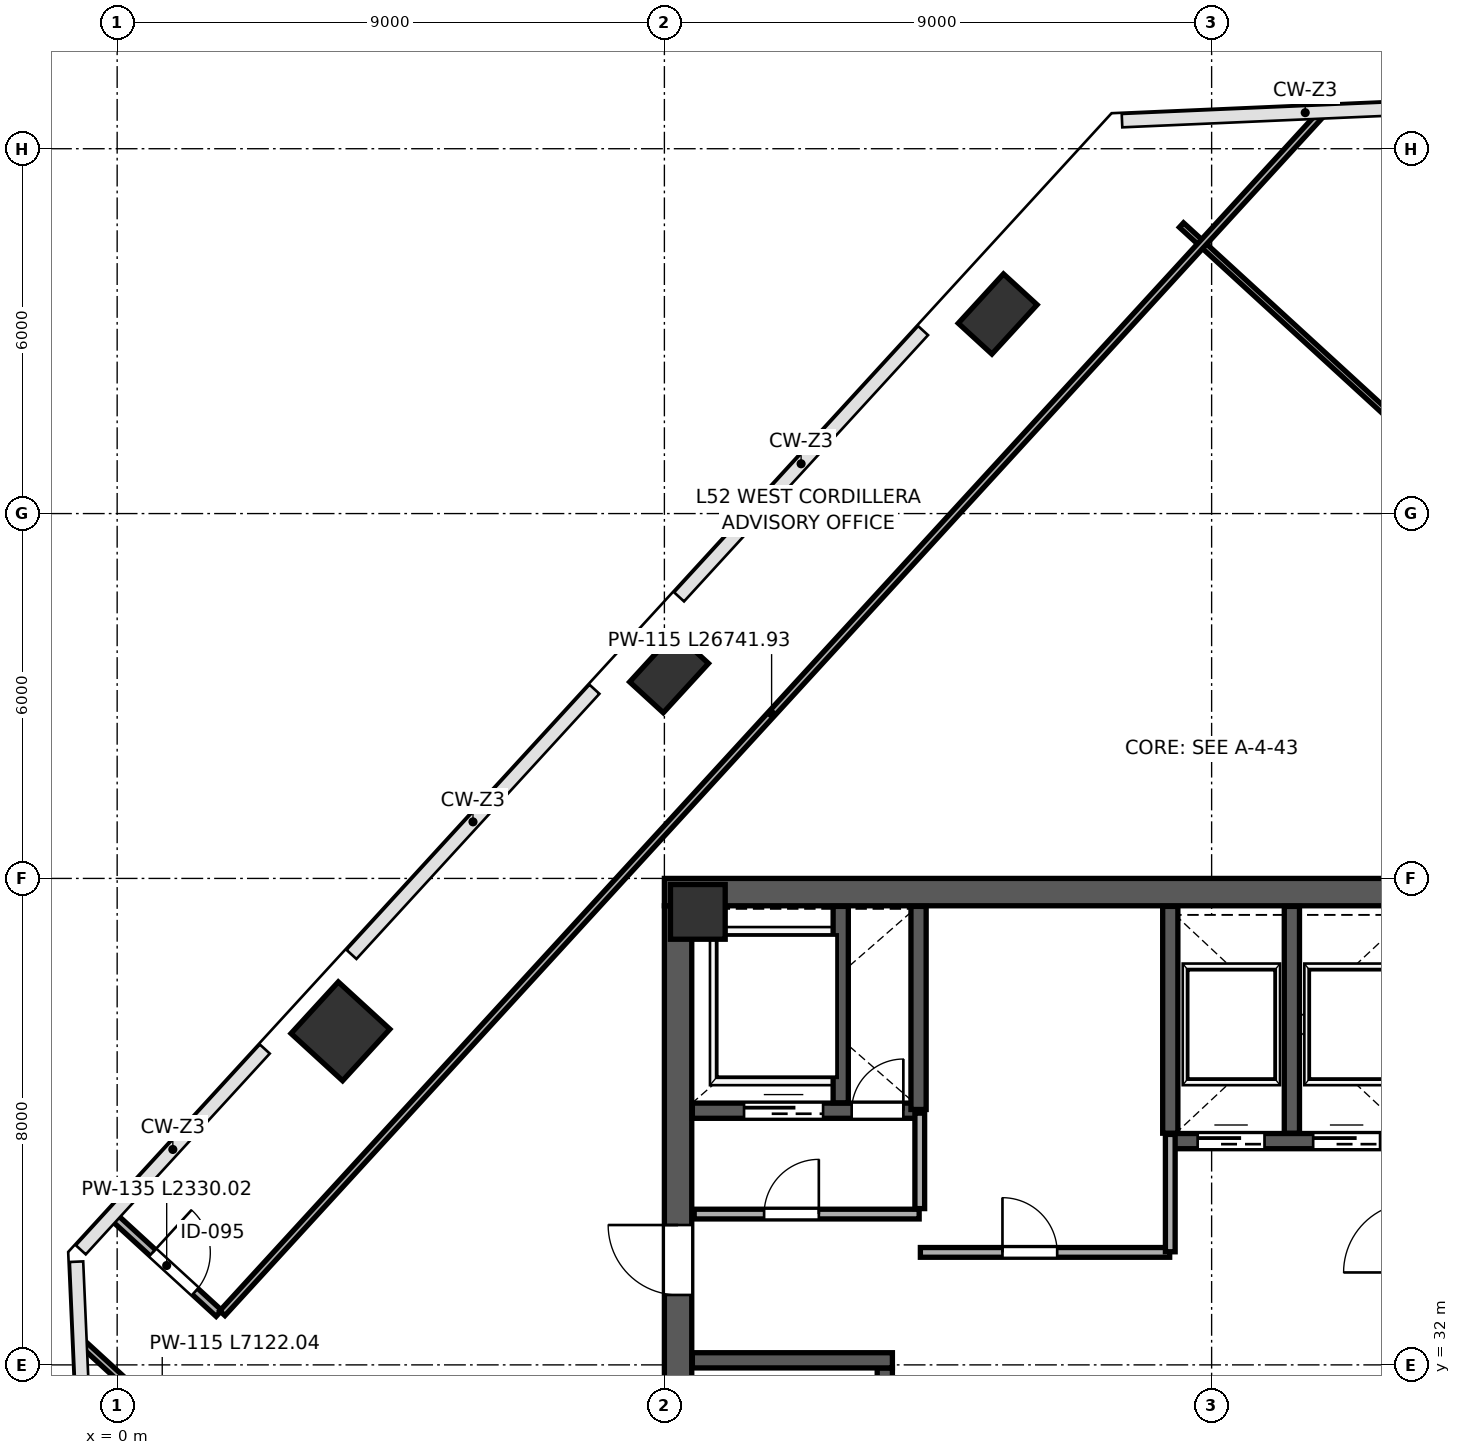
"""IFC4 building model, lengths in metres.
Left out: names, types, materials, properties, quantities, classifications, styles, units other than length and angle.
Written with IfcOpenShell. Run it as: python <this file> out.ifc"""

import sys

from ifc_helpers import new_model, si_unit, direction, frame, frame_2d, origin, origin_2d, place, context, subcontext, project, spatial, rectangle, extrude, source, transform, mapped, element, fill, save


model = new_model("IFC4")
c1 = context("Model", 3, precision=1e-05, world=origin(), true_north=direction((0.0, 1.0)))
c2 = subcontext(c1, "Body", "Model", "MODEL_VIEW")
j1 = project(units=[si_unit("LENGTHUNIT", "METRE"), si_unit("PLANEANGLEUNIT", "RADIAN")], contexts=[c1])
p1 = place(None, origin())
s1 = spatial("IfcSite", under=j1, at=p1, CompositionType="ELEMENT")
p2 = place(p1, origin())
s2 = spatial("IfcBuilding", under=s1, at=p2, CompositionType="ELEMENT")
p3 = place(p2, frame((0.0, 0.0, 233.2)))
s3 = spatial("IfcBuildingStorey", under=s2, at=p3, CompositionType="ELEMENT", Elevation=233.2)
m1 = source(origin(), c2, "Body", "SweptSolid", [
    extrude(rectangle(XDim=0.9, YDim=0.9, at=origin_2d()), origin(), (0.0, 0.0, 1.0), 4.198),
])
p4 = place(p3, frame((9.55, 39.45, 0.001), z_axis=(0.0, 0.0, 1.0), x_axis=(1.0, 0.0, 0.0)))
e1 = element("IfcColumn", 1, at=p4, inside=s3, PredefinedType="COLUMN", context=c2, shape_type="MappedRepresentation", body=[
    mapped(m1, transform((0.0, 0.0, 0.0), scale=1.0)),
])
m2 = source(origin(), c2, "Body", "SweptSolid", [
    extrude(rectangle(XDim=1.15, YDim=1.15, at=origin_2d()), origin(), (0.0, 0.0, 1.0), 4.198),
])
p5 = place(p3, frame((3.672, 37.486, 0.001), z_axis=(0.0, 0.0, 1.0), x_axis=(-0.73727733681, 0.675590207616, 0.0)))
e2 = element("IfcColumn", 2, at=p5, inside=s3, PredefinedType="COLUMN", context=c2, shape_type="MappedRepresentation", body=[
    mapped(m2, transform((0.0, 0.0, 0.0), scale=1.0)),
])
m3 = source(origin(), c2, "Body", "SweptSolid", [
    extrude(rectangle(XDim=0.75, YDim=1.1, at=origin_2d()), origin(), (0.0, 0.0, 1.0), 4.198),
])
for number, where, z_axis, x_axis in (
    (3, (9.077, 43.384, 0.001), (0.0, 0.0, 1.0), (-0.737, 0.676, 0.0)),
    (4, (14.482, 49.282, 0.001), (0.0, 0.0, 1.0), (-0.737, 0.676, 0.0)),
):
    element("IfcColumn", number, at=place(p3, frame(where, z_axis=z_axis, x_axis=x_axis)), inside=s3, PredefinedType="PILASTER", context=c2, shape_type="MappedRepresentation", body=[
        mapped(m3, transform((0.0, 0.0, 0.0), scale=1.0)),
    ])
p6 = place(p3, frame((9.225, 24.45, 0.0), z_axis=(0.0, 0.0, 1.0), x_axis=(0.0, 1.0, 0.0)))
e5 = element("IfcWall", 5, at=p6, inside=s3, PredefinedType="SHEAR", context=c2, shape_type="SweptSolid", body=[
    extrude(rectangle(XDim=15.1, YDim=0.45, at=frame_2d((7.55, 0.0))), origin(), (0.0, 0.0, 1.0), 3.96),
])
p7 = place(p6, frame((8.7, 0.0, 0.0)))
e6 = element("IfcOpeningElement", 6, at=p7, cuts=e5, PredefinedType="OPENING", context=c2, shape_type="SweptSolid", body=[
    extrude(rectangle(XDim=1.15, YDim=2.2, at=frame_2d((0.575, 1.1))), frame((0.0, 0.235, 0.0), z_axis=(0.0, -1.0, 0.0), x_axis=(1.0, 0.0, 0.0)), (0.0, 0.0, 1.0), 0.47),
])
p8 = place(p3, frame((9.0, 39.775, 0.0), z_axis=(0.0, 0.0, 1.0), x_axis=(1.0, 0.0, 0.0)))
e7 = element("IfcWall", 7, at=p8, inside=s3, PredefinedType="SHEAR", context=c2, shape_type="SweptSolid", body=[
    extrude(rectangle(XDim=18.0, YDim=0.45, at=frame_2d((9.0, 0.0))), origin(), (0.0, 0.0, 1.0), 3.96),
])
p9 = place(p3, frame((12.625, 24.46, 0.0), z_axis=(0.0, 0.0, 1.0), x_axis=(0.0, 1.0, 0.0)))
e8 = element("IfcWall", 8, at=p9, inside=s3, PredefinedType="SHEAR", context=c2, shape_type="SweptSolid", body=[
    extrude(rectangle(XDim=7.49, YDim=0.25, at=frame_2d((3.745, 0.0))), origin(), (0.0, 0.0, 1.0), 3.96),
])
p10 = place(p9, frame((5.85, 0.0, 0.0)))
e9 = element("IfcOpeningElement", 9, at=p10, cuts=e8, PredefinedType="OPENING", context=c2, shape_type="SweptSolid", body=[
    extrude(rectangle(XDim=1.15, YDim=2.2, at=frame_2d((0.575, 1.1))), frame((0.0, 0.135, 0.0), z_axis=(0.0, -1.0, 0.0), x_axis=(1.0, 0.0, 0.0)), (0.0, 0.0, 1.0), 0.27),
])
p11 = place(p3, frame((9.46, 32.075, 0.0), z_axis=(0.0, 0.0, 1.0), x_axis=(1.0, 0.0, 0.0)))
e10 = element("IfcWall", 10, at=p11, inside=s3, PredefinedType="SHEAR", context=c2, shape_type="SweptSolid", body=[
    extrude(rectangle(XDim=3.29, YDim=0.25, at=frame_2d((1.645, 0.0))), origin(), (0.0, 0.0, 1.0), 3.96),
])
p12 = place(p3, frame((9.46, 36.18, 0.0), z_axis=(0.0, 0.0, 1.0), x_axis=(1.0, 0.0, 0.0)))
e11 = element("IfcWall", 11, at=p12, inside=s3, PredefinedType="SHEAR", context=c2, shape_type="SweptSolid", body=[
    extrude(rectangle(XDim=3.79, YDim=0.25, at=frame_2d((1.895, 0.0))), origin(), (0.0, 0.0, 1.0), 3.96),
])
p13 = place(p12, frame((2.62, 0.0, 0.0)))
e12 = element("IfcOpeningElement", 12, at=p13, cuts=e11, PredefinedType="OPENING", context=c2, shape_type="SweptSolid", body=[
    extrude(rectangle(XDim=0.85, YDim=2.1, at=frame_2d((0.425, 1.05))), frame((0.0, 0.135, 0.0), z_axis=(0.0, -1.0, 0.0), x_axis=(1.0, 0.0, 0.0)), (0.0, 0.0, 1.0), 0.27),
])
p14 = place(p12, frame((0.85, 0.0, 0.0)))
e13 = element("IfcOpeningElement", 13, at=p14, cuts=e11, PredefinedType="OPENING", context=c2, shape_type="SweptSolid", body=[
    extrude(rectangle(XDim=1.3, YDim=2.25, at=frame_2d((0.65, 1.125))), frame((0.0, 0.135, 0.0), z_axis=(0.0, -1.0, 0.0), x_axis=(1.0, 0.0, 0.0)), (0.0, 0.0, 1.0), 0.27),
])
p15 = place(p3, frame((11.9, 36.31, 0.0), z_axis=(0.0, 0.0, 1.0), x_axis=(0.0, 1.0, 0.0)))
e14 = element("IfcWall", 14, at=p15, inside=s3, PredefinedType="SHEAR", context=c2, shape_type="SweptSolid", body=[
    extrude(rectangle(XDim=3.23, YDim=0.25, at=frame_2d((1.615, 0.0))), origin(), (0.0, 0.0, 1.0), 3.96),
])
p16 = place(p3, frame((13.18, 36.2, 0.0), z_axis=(0.0, 0.0, 1.0), x_axis=(0.0, 1.0, 0.0)))
e15 = element("IfcWall", 15, at=p16, inside=s3, PredefinedType="SHEAR", context=c2, shape_type="SweptSolid", body=[
    extrude(rectangle(XDim=3.34, YDim=0.25, at=frame_2d((1.67, 0.0))), origin(), (0.0, 0.0, 1.0), 3.96),
])
p17 = place(p3, frame((17.32, 35.68, 0.0), z_axis=(0.0, 0.0, 1.0), x_axis=(1.0, 0.0, 0.0)))
e16 = element("IfcWall", 16, at=p17, inside=s3, PredefinedType="SHEAR", context=c2, shape_type="SweptSolid", body=[
    extrude(rectangle(XDim=3.87, YDim=0.25, at=frame_2d((1.935, 0.0))), origin(), (0.0, 0.0, 1.0), 3.96),
])
p18 = place(p17, frame((0.45, 0.0, 0.0)))
e17 = element("IfcOpeningElement", 17, at=p18, cuts=e16, PredefinedType="OPENING", context=c2, shape_type="SweptSolid", body=[
    extrude(rectangle(XDim=1.1, YDim=2.2, at=frame_2d((0.55, 1.1))), frame((0.0, 0.135, 0.0), z_axis=(0.0, -1.0, 0.0), x_axis=(1.0, 0.0, 0.0)), (0.0, 0.0, 1.0), 0.27),
])
p19 = place(p17, frame((2.35, 0.0, 0.0)))
e18 = element("IfcOpeningElement", 18, at=p19, cuts=e16, PredefinedType="OPENING", context=c2, shape_type="SweptSolid", body=[
    extrude(rectangle(XDim=1.1, YDim=2.2, at=frame_2d((0.55, 1.1))), frame((0.0, 0.135, 0.0), z_axis=(0.0, -1.0, 0.0), x_axis=(1.0, 0.0, 0.0)), (0.0, 0.0, 1.0), 0.27),
])
for number, where, z_axis, x_axis in (
    (19, (17.32, 35.81, 0.0), (0.0, 0.0, 1.0), (0.0, 1.0, 0.0)),
    (20, (19.32, 35.81, 0.0), (0.0, 0.0, 1.0), (0.0, 1.0, 0.0)),
):
    element("IfcWall", number, at=place(p3, frame(where, z_axis=z_axis, x_axis=x_axis)), inside=s3, PredefinedType="SHEAR", context=c2, shape_type="SweptSolid", body=[
        extrude(rectangle(XDim=3.73, YDim=0.25, at=frame_2d((1.865, 0.0))), origin(), (0.0, 0.0, 1.0), 3.96),
    ])
p20 = place(p3, frame((9.49, 34.48, 0.0), z_axis=(0.0, 0.0, 1.0), x_axis=(1.0, 0.0, 0.0)))
e21 = element("IfcWall", 21, at=p20, inside=s3, PredefinedType="PARTITIONING", context=c2, shape_type="SweptSolid", body=[
    extrude(rectangle(XDim=3.7, YDim=0.16, at=frame_2d((1.85, 0.0))), origin(), (0.0, 0.0, 1.0), 3.96),
])
p21 = place(p20, frame((1.15, 0.0, 0.0)))
e22 = element("IfcOpeningElement", 22, at=p21, cuts=e21, PredefinedType="OPENING", context=c2, shape_type="SweptSolid", body=[
    extrude(rectangle(XDim=0.9, YDim=2.15, at=frame_2d((0.45, 1.075))), frame((0.0, 0.09, 0.0), z_axis=(0.0, -1.0, 0.0), x_axis=(1.0, 0.0, 0.0)), (0.0, 0.0, 1.0), 0.18),
])
p22 = place(p3, frame((13.2, 34.57, 0.0), z_axis=(0.0, 0.0, 1.0), x_axis=(0.0, 1.0, 0.0)))
e23 = element("IfcWall", 23, at=p22, inside=s3, PredefinedType="PARTITIONING", context=c2, shape_type="SweptSolid", body=[
    extrude(rectangle(XDim=1.57, YDim=0.16, at=frame_2d((0.785, 0.0))), origin(), (0.0, 0.0, 1.0), 3.96),
])
p23 = place(p3, frame((13.21, 33.85, 0.0), z_axis=(0.0, 0.0, 1.0), x_axis=(1.0, 0.0, 0.0)))
e24 = element("IfcWall", 24, at=p23, inside=s3, PredefinedType="PARTITIONING", context=c2, shape_type="SweptSolid", body=[
    extrude(rectangle(XDim=4.1, YDim=0.16, at=frame_2d((2.05, 0.0))), origin(), (0.0, 0.0, 1.0), 3.96),
])
p24 = place(p23, frame((1.35, 0.0, 0.0)))
e25 = element("IfcOpeningElement", 25, at=p24, cuts=e24, PredefinedType="OPENING", context=c2, shape_type="SweptSolid", body=[
    extrude(rectangle(XDim=0.9, YDim=2.15, at=frame_2d((0.45, 1.075))), frame((0.0, 0.09, 0.0), z_axis=(0.0, -1.0, 0.0), x_axis=(1.0, 0.0, 0.0)), (0.0, 0.0, 1.0), 0.18),
])
p25 = place(p3, frame((17.32, 33.86, 0.0), z_axis=(0.0, 0.0, 1.0), x_axis=(0.0, 1.0, 0.0)))
e26 = element("IfcWall", 26, at=p25, inside=s3, PredefinedType="PARTITIONING", context=c2, shape_type="SweptSolid", body=[
    extrude(rectangle(XDim=1.93, YDim=0.16, at=frame_2d((0.965, 0.0))), origin(), (0.0, 0.0, 1.0), 3.96),
])
p26 = place(p3, frame((-0.571, 32.354, 0.0), z_axis=(0.0, 0.0, 1.0), x_axis=(0.737285035525, -0.675581805846, 0.0)))
e27 = element("IfcWall", 27, at=p26, inside=s3, PredefinedType="PARTITIONING", context=c2, shape_type="SweptSolid", body=[
    extrude(rectangle(XDim=7.122, YDim=0.115, at=frame_2d((3.561, 0.0))), origin(), (0.0, 0.0, 1.0), 3.96),
])
p27 = place(p26, frame((2.6, 0.0, 0.0)))
e28 = element("IfcOpeningElement", 28, at=p27, cuts=e27, PredefinedType="OPENING", context=c2, shape_type="SweptSolid", body=[
    extrude(rectangle(XDim=0.9, YDim=2.15, at=frame_2d((0.45, 1.075))), frame((0.0, 0.067, 0.0), z_axis=(0.0, -1.0, 0.0), x_axis=(1.0, 0.0, 0.0)), (0.0, 0.0, 1.0), 0.135),
])
p28 = place(p26, frame((4.7, 0.0, 0.0)))
e29 = element("IfcOpeningElement", 29, at=p28, cuts=e27, PredefinedType="OPENING", context=c2, shape_type="SweptSolid", body=[
    extrude(rectangle(XDim=0.95, YDim=2.15, at=frame_2d((0.475, 1.075))), frame((0.0, 0.067, 0.0), z_axis=(0.0, -1.0, 0.0), x_axis=(1.0, 0.0, 0.0)), (0.0, 0.0, 1.0), 0.135),
])
p29 = place(p3, frame((17.504, 50.744, 0.0), z_axis=(0.0, 0.0, 1.0), x_axis=(0.737277850523, -0.675589646996, 0.0)))
e30 = element("IfcWall", 30, at=p29, inside=s3, PredefinedType="PARTITIONING", context=c2, shape_type="SweptSolid", body=[
    extrude(rectangle(XDim=21.87, YDim=0.1, at=frame_2d((10.935, 0.0))), origin(), (0.0, 0.0, 1.0), 3.96),
])
p30 = place(p29, frame((5.4, 0.0, 0.0)))
e31 = element("IfcOpeningElement", 31, at=p30, cuts=e30, PredefinedType="OPENING", context=c2, shape_type="SweptSolid", body=[
    extrude(rectangle(XDim=0.95, YDim=2.15, at=frame_2d((0.475, 1.075))), frame((0.0, 0.06, 0.0), z_axis=(0.0, -1.0, 0.0), x_axis=(1.0, 0.0, 0.0)), (0.0, 0.0, 1.0), 0.12),
])
p31 = place(p3, frame((-0.044, 34.421, 0.0), z_axis=(0.0, 0.0, 1.0), x_axis=(0.73728894688, -0.675577537229, 0.0)))
e32 = element("IfcWall", 32, at=p31, inside=s3, PredefinedType="PARTITIONING", context=c2, shape_type="SweptSolid", body=[
    extrude(rectangle(XDim=2.33, YDim=0.135, at=frame_2d((1.165, 0.0))), origin(), (0.0, 0.0, 1.0), 3.96),
])
p32 = place(p31, frame((0.85, 0.0, 0.0)))
e33 = element("IfcOpeningElement", 33, at=p32, cuts=e32, PredefinedType="OPENING", context=c2, shape_type="SweptSolid", body=[
    extrude(rectangle(XDim=0.95, YDim=2.15, at=frame_2d((0.475, 1.075))), frame((0.0, 0.078, 0.0), z_axis=(0.0, -1.0, 0.0), x_axis=(1.0, 0.0, 0.0)), (0.0, 0.0, 1.0), 0.155),
])
p33 = place(p3, frame((1.73, 32.85, 0.0), z_axis=(0.0, 0.0, 1.0), x_axis=(0.675589845589, 0.737277668546, 0.0)))
e34 = element("IfcWall", 34, at=p33, inside=s3, PredefinedType="PARTITIONING", context=c2, shape_type="SweptSolid", body=[
    extrude(rectangle(XDim=26.742, YDim=0.115, at=frame_2d((13.371, 0.0))), origin(), (0.0, 0.0, 1.0), 3.96),
])
m4 = source(origin(), c2, "Body", "SweptSolid", [
    extrude(rectangle(XDim=1.15, YDim=2.2, at=frame_2d((0.575, 1.1))), frame((0.0, 0.025, 0.0), z_axis=(0.0, -1.0, 0.0), x_axis=(1.0, 0.0, 0.0)), (0.0, 0.0, 1.0), 0.05),
])
p34 = place(p7, origin())
e35 = element("IfcDoor", 35, at=p34, inside=s3, OperationType="SINGLE_SWING_RIGHT", PredefinedType="DOOR", context=c2, shape_type="MappedRepresentation", body=[
    mapped(m4, transform((0.0, 0.0, 0.0), scale=1.0)),
])
fill(e6, e35)
m5 = source(origin(), c2, "Body", "SweptSolid", [
    extrude(rectangle(XDim=0.85, YDim=2.1, at=frame_2d((0.425, 1.05))), frame((0.0, 0.025, 0.0), z_axis=(0.0, -1.0, 0.0), x_axis=(1.0, 0.0, 0.0)), (0.0, 0.0, 1.0), 0.05),
])
p35 = place(p13, origin())
e36 = element("IfcDoor", 36, at=p35, inside=s3, OperationType="SINGLE_SWING_RIGHT", PredefinedType="DOOR", context=c2, shape_type="MappedRepresentation", body=[
    mapped(m5, transform((0.0, 0.0, 0.0), scale=1.0)),
])
fill(e12, e36)
m6 = source(origin(), c2, "Body", "SweptSolid", [
    extrude(rectangle(XDim=1.1, YDim=2.2, at=frame_2d((0.55, 1.1))), frame((0.0, 0.025, 0.0), z_axis=(0.0, -1.0, 0.0), x_axis=(1.0, 0.0, 0.0)), (0.0, 0.0, 1.0), 0.05),
])
p36 = place(p18, origin())
e37 = element("IfcDoor", 37, at=p36, inside=s3, OperationType="SLIDING_TO_LEFT", PredefinedType="DOOR", context=c2, shape_type="MappedRepresentation", body=[
    mapped(m6, transform((0.0, 0.0, 0.0), scale=1.0)),
])
fill(e17, e37)
p37 = place(p19, origin())
e38 = element("IfcDoor", 38, at=p37, inside=s3, OperationType="SLIDING_TO_RIGHT", PredefinedType="DOOR", context=c2, shape_type="MappedRepresentation", body=[
    mapped(m6, transform((0.0, 0.0, 0.0), scale=1.0)),
])
fill(e18, e38)
m7 = source(origin(), c2, "Body", "SweptSolid", [
    extrude(rectangle(XDim=1.3, YDim=2.25, at=frame_2d((0.65, 1.125))), frame((0.0, 0.025, 0.0), z_axis=(0.0, -1.0, 0.0), x_axis=(1.0, 0.0, 0.0)), (0.0, 0.0, 1.0), 0.05),
])
p38 = place(p14, origin())
e39 = element("IfcDoor", 39, at=p38, inside=s3, OperationType="SLIDING_TO_LEFT", PredefinedType="DOOR", context=c2, shape_type="MappedRepresentation", body=[
    mapped(m7, transform((0.0, 0.0, 0.0), scale=1.0)),
])
fill(e13, e39)
m8 = source(origin(), c2, "Body", "SweptSolid", [
    extrude(rectangle(XDim=0.9, YDim=2.15, at=frame_2d((0.45, 1.075))), frame((0.0, 0.025, 0.0), z_axis=(0.0, -1.0, 0.0), x_axis=(1.0, 0.0, 0.0)), (0.0, 0.0, 1.0), 0.05),
])
p39 = place(p21, origin())
e40 = element("IfcDoor", 40, at=p39, inside=s3, OperationType="SINGLE_SWING_RIGHT", PredefinedType="DOOR", context=c2, shape_type="MappedRepresentation", body=[
    mapped(m8, transform((0.0, 0.0, 0.0), scale=1.0)),
])
fill(e22, e40)
p40 = place(p24, origin())
e41 = element("IfcDoor", 41, at=p40, inside=s3, OperationType="SINGLE_SWING_LEFT", PredefinedType="DOOR", context=c2, shape_type="MappedRepresentation", body=[
    mapped(m8, transform((0.0, 0.0, 0.0), scale=1.0)),
])
fill(e25, e41)
m9 = source(origin(), c2, "Body", "SweptSolid", [
    extrude(rectangle(XDim=0.95, YDim=2.15, at=frame_2d((0.475, 1.075))), frame((0.0, 0.025, 0.0), z_axis=(0.0, -1.0, 0.0), x_axis=(1.0, 0.0, 0.0)), (0.0, 0.0, 1.0), 0.05),
])
p41 = place(p32, origin())
e42 = element("IfcDoor", 42, at=p41, inside=s3, OperationType="SINGLE_SWING_LEFT", PredefinedType="DOOR", context=c2, shape_type="MappedRepresentation", body=[
    mapped(m9, transform((0.0, 0.0, 0.0), scale=1.0)),
])
fill(e33, e42)
save(model, sys.argv[1])
